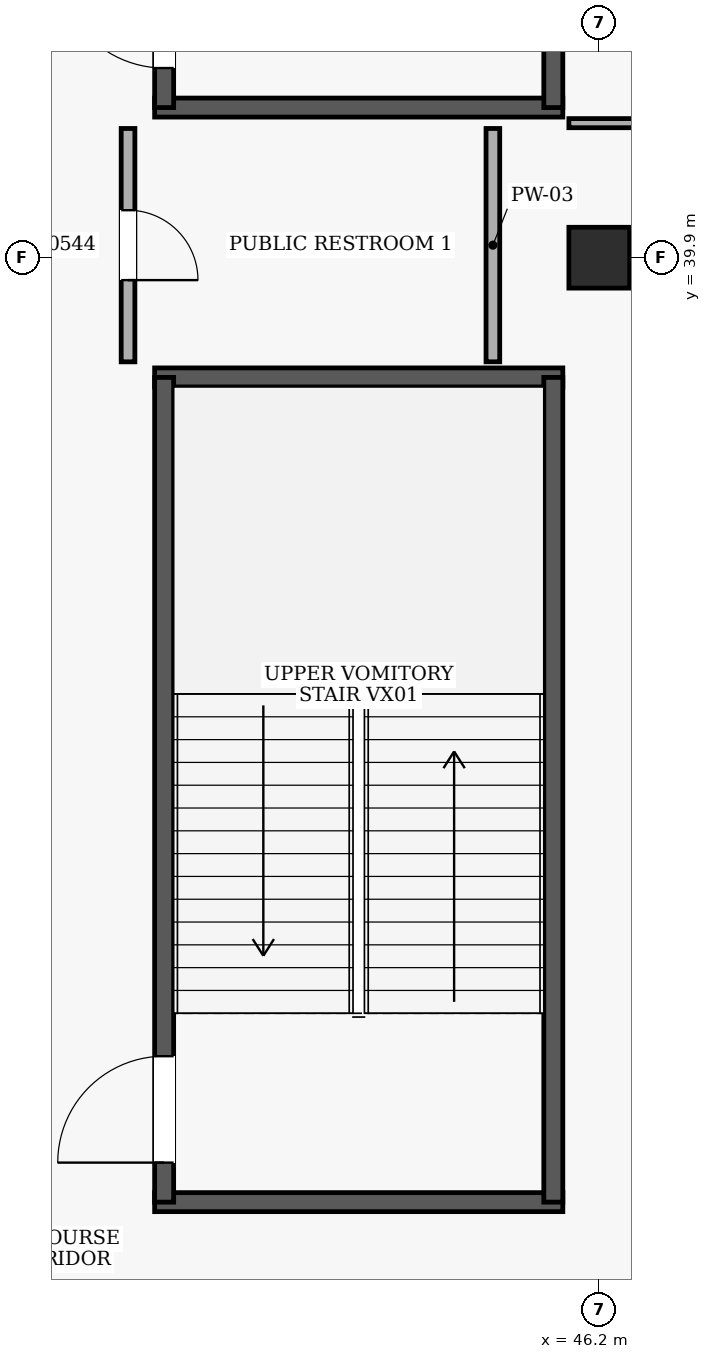
"""IFC4 building model, lengths in metres.
Left out: names, types, materials, properties, quantities, classifications, styles, units other than length and angle.
Written with IfcOpenShell. Run it as: python <this file> out.ifc"""

import sys

from ifc_helpers import new_model, si_unit, direction, frame, frame_2d, origin, origin_2d, place, context, subcontext, project, spatial, rectangle, extrude, element, fill, save


model = new_model("IFC4")
c1 = context("Model", 3, precision=1e-05, world=origin(), true_north=direction((0.0, 1.0)))
c2 = subcontext(c1, "Body", "Model", "MODEL_VIEW")
j1 = project(units=[si_unit("LENGTHUNIT", "METRE"), si_unit("PLANEANGLEUNIT", "RADIAN")], contexts=[c1])
p1 = place(None, origin())
s1 = spatial("IfcSite", under=j1, at=p1, CompositionType="ELEMENT")
p2 = place(p1, origin())
s2 = spatial("IfcBuilding", under=s1, at=p2, CompositionType="ELEMENT")
p3 = place(p2, frame((0.0, 0.0, 10.2)))
s3 = spatial("IfcBuildingStorey", under=s2, at=p3, CompositionType="ELEMENT", Elevation=10.2)
p4 = place(p3, frame((46.2, 39.9, 0.0), z_axis=(0.0, 0.0, 1.0), x_axis=(1.0, 0.0, 0.0)))
e1 = element("IfcColumn", 1, at=p4, inside=s3, PredefinedType="COLUMN", context=c2, shape_type="SweptSolid", body=[
    extrude(rectangle(XDim=0.8, YDim=0.8, at=origin_2d()), origin(), (0.0, 0.0, 1.0), 4.8),
])
for number, where, z_axis, x_axis in (
    (2, (40.35, 27.475, 0.0), (0.0, 0.0, 1.0), (1.0, 0.0, 0.0)),
    (3, (45.72, 38.325, 0.0), (0.0, 0.0, 1.0), (-1.0, 0.0, 0.0)),
):
    element("IfcWall", number, at=place(p3, frame(where, z_axis=z_axis, x_axis=x_axis)), inside=s3, PredefinedType="SHEAR", context=c2, shape_type="SweptSolid", body=[
        extrude(rectangle(XDim=5.37, YDim=0.25, at=frame_2d((2.685, 0.0))), origin(), (0.0, 0.0, 1.0), 4.48),
    ])
p5 = place(p3, frame((40.475, 27.475, 0.0), z_axis=(0.0, 0.0, 1.0), x_axis=(0.0, 1.0, 0.0)))
e4 = element("IfcWall", 4, at=p5, inside=s3, PredefinedType="SHEAR", context=c2, shape_type="SweptSolid", body=[
    extrude(rectangle(XDim=10.85, YDim=0.25, at=frame_2d((5.425, 0.0))), origin(), (0.0, 0.0, 1.0), 4.48),
])
p6 = place(p5, frame((0.52, 0.0, 0.0)))
e5 = element("IfcOpeningElement", 5, at=p6, cuts=e4, PredefinedType="OPENING", context=c2, shape_type="SweptSolid", body=[
    extrude(rectangle(XDim=1.4, YDim=2.15, at=frame_2d((0.7, 1.075))), frame((0.0, 0.135, 0.0), z_axis=(0.0, -1.0, 0.0), x_axis=(1.0, 0.0, 0.0)), (0.0, 0.0, 1.0), 0.27),
])
p7 = place(p3, frame((45.595, 27.475, 0.0), z_axis=(0.0, 0.0, 1.0), x_axis=(0.0, 1.0, 0.0)))
e6 = element("IfcWall", 6, at=p7, inside=s3, PredefinedType="SHEAR", context=c2, shape_type="SweptSolid", body=[
    extrude(rectangle(XDim=10.85, YDim=0.25, at=frame_2d((5.425, 0.0))), origin(), (0.0, 0.0, 1.0), 4.48),
])
p8 = place(p3, frame((40.35, 41.875, 0.0), z_axis=(0.0, 0.0, 1.0), x_axis=(1.0, 0.0, 0.0)))
e7 = element("IfcWall", 7, at=p8, inside=s3, PredefinedType="SHEAR", context=c2, shape_type="SweptSolid", body=[
    extrude(rectangle(XDim=5.37, YDim=0.25, at=frame_2d((2.685, 0.0))), origin(), (0.0, 0.0, 1.0), 4.48),
])
p9 = place(p3, frame((40.475, 41.875, 0.0), z_axis=(0.0, 0.0, 1.0), x_axis=(0.0, 1.0, 0.0)))
e8 = element("IfcWall", 8, at=p9, inside=s3, PredefinedType="SHEAR", context=c2, shape_type="SweptSolid", body=[
    extrude(rectangle(XDim=10.85, YDim=0.25, at=frame_2d((5.425, 0.0))), origin(), (0.0, 0.0, 1.0), 4.48),
])
p10 = place(p9, frame((0.52, 0.0, 0.0)))
e9 = element("IfcOpeningElement", 9, at=p10, cuts=e8, PredefinedType="OPENING", context=c2, shape_type="SweptSolid", body=[
    extrude(rectangle(XDim=1.4, YDim=2.15, at=frame_2d((0.7, 1.075))), frame((0.0, 0.135, 0.0), z_axis=(0.0, -1.0, 0.0), x_axis=(1.0, 0.0, 0.0)), (0.0, 0.0, 1.0), 0.27),
])
p11 = place(p3, frame((45.595, 41.875, 0.0), z_axis=(0.0, 0.0, 1.0), x_axis=(0.0, 1.0, 0.0)))
e10 = element("IfcWall", 10, at=p11, inside=s3, PredefinedType="SHEAR", context=c2, shape_type="SweptSolid", body=[
    extrude(rectangle(XDim=10.85, YDim=0.25, at=frame_2d((5.425, 0.0))), origin(), (0.0, 0.0, 1.0), 4.48),
])
p12 = place(p3, frame((44.8, 38.53, 0.0), z_axis=(0.0, 0.0, 1.0), x_axis=(0.0, 1.0, 0.0)))
e11 = element("IfcWall", 11, at=p12, inside=s3, PredefinedType="PARTITIONING", context=c2, shape_type="SweptSolid", body=[
    extrude(rectangle(XDim=3.07, YDim=0.18, at=frame_2d((1.535, 0.0))), origin(), (0.0, 0.0, 1.0), 4.48),
])
p13 = place(p3, frame((40.0, 41.6, 0.0), z_axis=(0.0, 0.0, 1.0), x_axis=(0.0, -1.0, 0.0)))
e12 = element("IfcWall", 12, at=p13, inside=s3, PredefinedType="PARTITIONING", context=c2, shape_type="SweptSolid", body=[
    extrude(rectangle(XDim=3.07, YDim=0.18, at=frame_2d((1.535, 0.0))), origin(), (0.0, 0.0, 1.0), 4.48),
])
p14 = place(p13, frame((1.075, 0.0, 0.0)))
e13 = element("IfcOpeningElement", 13, at=p14, cuts=e12, PredefinedType="OPENING", context=c2, shape_type="SweptSolid", body=[
    extrude(rectangle(XDim=0.92, YDim=2.1, at=frame_2d((0.46, 1.05))), frame((0.0, 0.1, 0.0), z_axis=(0.0, -1.0, 0.0), x_axis=(1.0, 0.0, 0.0)), (0.0, 0.0, 1.0), 0.2),
])
p15 = place(p3, frame((45.8, 41.67, 0.0), z_axis=(0.0, 0.0, 1.0), x_axis=(1.0, 0.0, 0.0)))
e14 = element("IfcWall", 14, at=p15, inside=s3, PredefinedType="PARTITIONING", context=c2, shape_type="SweptSolid", body=[
    extrude(rectangle(XDim=14.8, YDim=0.12, at=frame_2d((7.4, 0.0))), origin(), (0.0, 0.0, 1.0), 4.48),
])
p16 = place(p6, frame((1.4, 0.0, 0.0), z_axis=(0.0, 0.0, 1.0), x_axis=(-1.0, 0.0, 0.0)))
e15 = element("IfcDoor", 15, at=p16, inside=s3, OperationType="SINGLE_SWING_RIGHT", PredefinedType="DOOR", context=c2, shape_type="SweptSolid", body=[
    extrude(rectangle(XDim=1.4, YDim=2.15, at=frame_2d((0.7, 1.075))), frame((0.0, 0.025, 0.0), z_axis=(0.0, -1.0, 0.0), x_axis=(1.0, 0.0, 0.0)), (0.0, 0.0, 1.0), 0.05),
])
fill(e5, e15)
p17 = place(p10, frame((1.4, 0.0, 0.0), z_axis=(0.0, 0.0, 1.0), x_axis=(-1.0, 0.0, 0.0)))
e16 = element("IfcDoor", 16, at=p17, inside=s3, OperationType="SINGLE_SWING_LEFT", PredefinedType="DOOR", context=c2, shape_type="SweptSolid", body=[
    extrude(rectangle(XDim=1.4, YDim=2.15, at=frame_2d((0.7, 1.075))), frame((0.0, 0.025, 0.0), z_axis=(0.0, -1.0, 0.0), x_axis=(1.0, 0.0, 0.0)), (0.0, 0.0, 1.0), 0.05),
])
fill(e9, e16)
p18 = place(p14, origin())
e17 = element("IfcDoor", 17, at=p18, inside=s3, OperationType="SINGLE_SWING_RIGHT", PredefinedType="DOOR", context=c2, shape_type="SweptSolid", body=[
    extrude(rectangle(XDim=0.92, YDim=2.1, at=frame_2d((0.46, 1.05))), frame((0.0, 0.025, 0.0), z_axis=(0.0, -1.0, 0.0), x_axis=(1.0, 0.0, 0.0)), (0.0, 0.0, 1.0), 0.05),
])
fill(e13, e17)
save(model, sys.argv[1])
